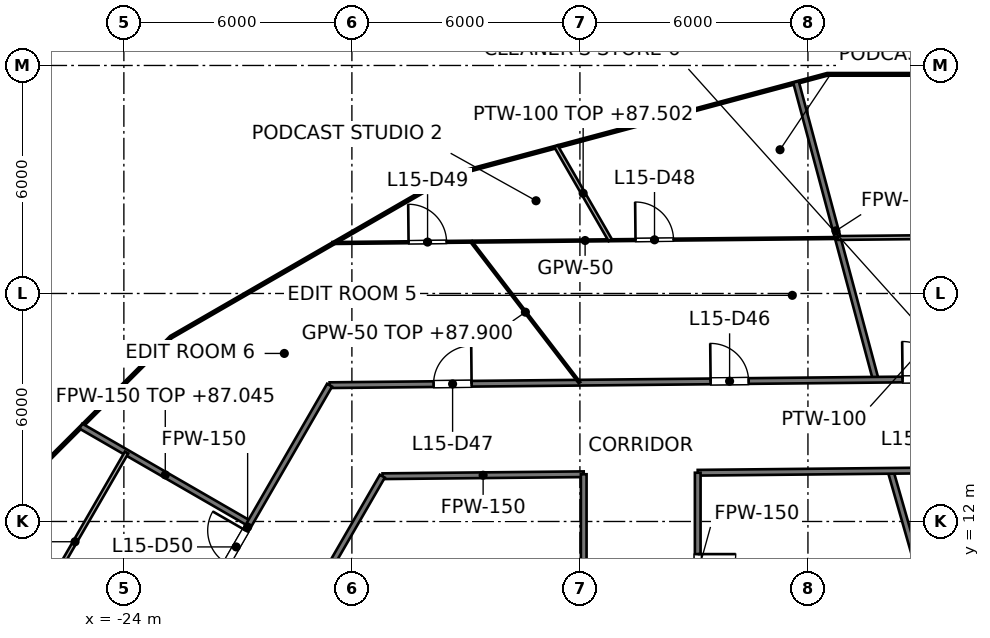
"""IFC4 building model, lengths in metres.
Left out: names, types, materials, properties, quantities, classifications, styles, units other than length and angle.
Written with IfcOpenShell. Run it as: python <this file> out.ifc"""

import sys

from ifc_helpers import new_model, si_unit, direction, frame, frame_2d, origin, place, context, subcontext, project, spatial, rectangle, extrude, element, fill, save


model = new_model("IFC4")
c1 = context("Model", 3, precision=1e-05, world=origin(), true_north=direction((0.0, 1.0)))
c2 = subcontext(c1, "Body", "Model", "MODEL_VIEW")
j1 = project(units=[si_unit("LENGTHUNIT", "METRE"), si_unit("PLANEANGLEUNIT", "RADIAN")], contexts=[c1])
p1 = place(None, origin())
s1 = spatial("IfcSite", under=j1, at=p1, CompositionType="ELEMENT")
p2 = place(p1, origin())
s2 = spatial("IfcBuilding", under=s1, at=p2, CompositionType="ELEMENT")
p3 = place(p2, frame((0.0, 0.0, 84.0)))
s3 = spatial("IfcBuildingStorey", under=s2, at=p3, CompositionType="ELEMENT", Elevation=84.0)
p4 = place(p3, frame((-6.315, 23.566, 0.0), z_axis=(0.0, 0.0, 1.0), x_axis=(0.258844392232, -0.96591903419, 0.0)))
e1 = element("IfcWall", 1, at=p4, inside=s3, PredefinedType="PARTITIONING", context=c2, shape_type="SweptSolid", body=[
    extrude(rectangle(XDim=8.112, YDim=0.15, at=frame_2d((4.056, 0.0))), origin(), (0.0, 0.0, 1.0), 3.502),
])
p5 = place(p3, frame((-3.827, 13.333, 0.0), z_axis=(0.0, 0.0, 1.0), x_axis=(0.275935525478, -0.961176147113, 0.0)))
e2 = element("IfcWall", 2, at=p5, inside=s3, PredefinedType="PARTITIONING", context=c2, shape_type="SweptSolid", body=[
    extrude(rectangle(XDim=5.548, YDim=0.15, at=frame_2d((2.774, 0.0))), origin(), (0.0, 0.0, 1.0), 3.9),
])
p6 = place(p3, frame((-25.131, 14.509, 0.0), z_axis=(0.0, 0.0, 1.0), x_axis=(0.866037334331, -0.499979335118, 0.0)))
e3 = element("IfcWall", 3, at=p6, inside=s3, PredefinedType="PARTITIONING", context=c2, shape_type="SweptSolid", body=[
    extrude(rectangle(XDim=5.128, YDim=0.15, at=frame_2d((2.564, 0.0))), origin(), (0.0, 0.0, 1.0), 3.045),
])
p7 = place(p3, frame((-17.194, 13.191, 0.0), z_axis=(0.0, 0.0, 1.0), x_axis=(0.999950853109, 0.009914200296, 0.0)))
e4 = element("IfcWall", 4, at=p7, inside=s3, PredefinedType="PARTITIONING", context=c2, shape_type="SweptSolid", body=[
    extrude(rectangle(XDim=5.294, YDim=0.15, at=frame_2d((2.647, 0.0))), origin(), (0.0, 0.0, 1.0), 2.968),
])
p8 = place(p3, frame((-8.9, 13.282, 0.0), z_axis=(0.0, 0.0, 1.0), x_axis=(0.999950834077, 0.009916119672, 0.0)))
e5 = element("IfcWall", 5, at=p8, inside=s3, PredefinedType="PARTITIONING", context=c2, shape_type="SweptSolid", body=[
    extrude(rectangle(XDim=17.801, YDim=0.15, at=frame_2d((8.9, 0.0))), origin(), (0.0, 0.0, 1.0), 2.968),
])
p9 = place(p8, frame((8.412, 0.0, 0.0)))
e6 = element("IfcOpeningElement", 6, at=p9, cuts=e5, PredefinedType="OPENING", context=c2, shape_type="SweptSolid", body=[
    extrude(rectangle(XDim=1.0, YDim=2.1, at=frame_2d((0.5, 1.05))), frame((0.0, 0.075, 0.0), z_axis=(0.0, -1.0, 0.0), x_axis=(1.0, 0.0, 0.0)), (0.0, 0.0, 1.0), 0.15),
])
p10 = place(p3, frame((-18.587, 15.587, 0.0), z_axis=(0.0, 0.0, 1.0), x_axis=(0.99995087003, 0.009912493396, 0.0)))
e7 = element("IfcWall", 7, at=p10, inside=s3, PredefinedType="PARTITIONING", context=c2, shape_type="SweptSolid", body=[
    extrude(rectangle(XDim=33.669, YDim=0.15, at=frame_2d((16.834, 0.0))), origin(), (0.0, 0.0, 1.0), 2.968),
])
p11 = place(p10, frame((21.034, 0.0, 0.0)))
e8 = element("IfcOpeningElement", 8, at=p11, cuts=e7, PredefinedType="OPENING", context=c2, shape_type="SweptSolid", body=[
    extrude(rectangle(XDim=1.0, YDim=2.1, at=frame_2d((0.5, 1.05))), frame((0.0, 0.075, 0.0), z_axis=(0.0, -1.0, 0.0), x_axis=(1.0, 0.0, 0.0)), (0.0, 0.0, 1.0), 0.15),
])
p12 = place(p10, frame((17.73, 0.0, 0.0)))
e9 = element("IfcOpeningElement", 9, at=p12, cuts=e7, PredefinedType="OPENING", context=c2, shape_type="SweptSolid", body=[
    extrude(rectangle(XDim=1.0, YDim=2.1, at=frame_2d((0.5, 1.05))), frame((0.0, 0.075, 0.0), z_axis=(0.0, -1.0, 0.0), x_axis=(1.0, 0.0, 0.0)), (0.0, 0.0, 1.0), 0.15),
])
p13 = place(p10, frame((15.077, 0.0, 0.0)))
e10 = element("IfcOpeningElement", 10, at=p13, cuts=e7, PredefinedType="OPENING", context=c2, shape_type="SweptSolid", body=[
    extrude(rectangle(XDim=1.0, YDim=2.1, at=frame_2d((0.5, 1.05))), frame((0.0, 0.075, 0.0), z_axis=(0.0, -1.0, 0.0), x_axis=(1.0, 0.0, 0.0)), (0.0, 0.0, 1.0), 0.15),
])
p14 = place(p10, frame((10.026, 0.0, 0.0)))
e11 = element("IfcOpeningElement", 11, at=p14, cuts=e7, PredefinedType="OPENING", context=c2, shape_type="SweptSolid", body=[
    extrude(rectangle(XDim=1.0, YDim=2.1, at=frame_2d((0.5, 1.05))), frame((0.0, 0.075, 0.0), z_axis=(0.0, -1.0, 0.0), x_axis=(1.0, 0.0, 0.0)), (0.0, 0.0, 1.0), 0.15),
])
p15 = place(p10, frame((2.737, 0.0, 0.0)))
e12 = element("IfcOpeningElement", 12, at=p15, cuts=e7, PredefinedType="OPENING", context=c2, shape_type="SweptSolid", body=[
    extrude(rectangle(XDim=1.0, YDim=2.1, at=frame_2d((0.5, 1.05))), frame((0.0, 0.075, 0.0), z_axis=(0.0, -1.0, 0.0), x_axis=(1.0, 0.0, 0.0)), (0.0, 0.0, 1.0), 0.15),
])
p16 = place(p3, frame((-20.5, 7.474, 0.0), z_axis=(0.0, 0.0, 1.0), x_axis=(0.500012665616, 0.866018091164, 0.0)))
e13 = element("IfcWall", 13, at=p16, inside=s3, PredefinedType="PARTITIONING", context=c2, shape_type="SweptSolid", body=[
    extrude(rectangle(XDim=6.602, YDim=0.15, at=frame_2d((3.301, 0.0))), origin(), (0.0, 0.0, 1.0), 2.968),
])
p17 = place(p16, frame((2.803, 0.0, 0.0)))
e14 = element("IfcOpeningElement", 14, at=p17, cuts=e13, PredefinedType="OPENING", context=c2, shape_type="SweptSolid", body=[
    extrude(rectangle(XDim=1.0, YDim=2.1, at=frame_2d((0.5, 1.05))), frame((0.0, 0.075, 0.0), z_axis=(0.0, -1.0, 0.0), x_axis=(1.0, 0.0, 0.0)), (0.0, 0.0, 1.0), 0.15),
])
p18 = place(p3, frame((-22.9, 8.117, 0.0), z_axis=(0.0, 0.0, 1.0), x_axis=(0.5000050195, 0.866022505755, 0.0)))
e15 = element("IfcWall", 15, at=p18, inside=s3, PredefinedType="PARTITIONING", context=c2, shape_type="SweptSolid", body=[
    extrude(rectangle(XDim=8.626, YDim=0.15, at=frame_2d((4.313, 0.0))), origin(), (0.0, 0.0, 1.0), 2.968),
])
p19 = place(p18, frame((3.211, 0.0, 0.0)))
e16 = element("IfcOpeningElement", 16, at=p19, cuts=e15, PredefinedType="OPENING", context=c2, shape_type="SweptSolid", body=[
    extrude(rectangle(XDim=1.0, YDim=2.1, at=frame_2d((0.5, 1.05))), frame((0.0, 0.075, 0.0), z_axis=(0.0, -1.0, 0.0), x_axis=(1.0, 0.0, 0.0)), (0.0, 0.0, 1.0), 0.15),
])
p20 = place(p3, frame((-8.9, 8.0, 0.0), z_axis=(0.0, 0.0, 1.0), x_axis=(0.0, 1.0, 0.0)))
e17 = element("IfcWall", 17, at=p20, inside=s3, PredefinedType="PARTITIONING", context=c2, shape_type="SweptSolid", body=[
    extrude(rectangle(XDim=5.283, YDim=0.15, at=frame_2d((2.642, 0.0))), origin(), (0.0, 0.0, 1.0), 2.968),
])
p21 = place(p20, frame((2.142, 0.0, 0.0)))
e18 = element("IfcOpeningElement", 18, at=p21, cuts=e17, PredefinedType="OPENING", context=c2, shape_type="SweptSolid", body=[
    extrude(rectangle(XDim=1.0, YDim=2.1, at=frame_2d((0.5, 1.05))), frame((0.0, 0.075, 0.0), z_axis=(0.0, -1.0, 0.0), x_axis=(1.0, 0.0, 0.0)), (0.0, 0.0, 1.0), 0.15),
])
p22 = place(p3, frame((-11.9, 8.0, 0.0), z_axis=(0.0, 0.0, 1.0), x_axis=(0.0, 1.0, 0.0)))
e19 = element("IfcWall", 19, at=p22, inside=s3, PredefinedType="PARTITIONING", context=c2, shape_type="SweptSolid", body=[
    extrude(rectangle(XDim=5.243, YDim=0.15, at=frame_2d((2.622, 0.0))), origin(), (0.0, 0.0, 1.0), 2.968),
])
p23 = place(p3, frame((-14.859, 19.364, 0.0), z_axis=(0.0, 0.0, 1.0), x_axis=(0.608714147517, -0.793389618418, 0.0)))
e20 = element("IfcWall", 20, at=p23, inside=s3, PredefinedType="PARTITIONING", context=c2, shape_type="SweptSolid", body=[
    extrude(rectangle(XDim=4.678, YDim=0.05, at=frame_2d((2.339, 0.0))), origin(), (0.0, 0.0, 1.0), 3.9),
])
p24 = place(p3, frame((-18.512, 19.328, 0.0), z_axis=(0.0, 0.0, 1.0), x_axis=(0.999950851933, 0.009914318817, 0.0)))
e21 = element("IfcWall", 21, at=p24, inside=s3, PredefinedType="PARTITIONING", context=c2, shape_type="SweptSolid", body=[
    extrude(rectangle(XDim=13.298, YDim=0.05, at=frame_2d((6.649, 0.0))), origin(), (0.0, 0.0, 1.0), 2.968),
])
p25 = place(p24, frame((7.975, 0.0, 0.0)))
e22 = element("IfcOpeningElement", 22, at=p25, cuts=e21, PredefinedType="OPENING", context=c2, shape_type="SweptSolid", body=[
    extrude(rectangle(XDim=1.0, YDim=2.1, at=frame_2d((0.5, 1.05))), frame((0.0, 0.025, 0.0), z_axis=(0.0, -1.0, 0.0), x_axis=(1.0, 0.0, 0.0)), (0.0, 0.0, 1.0), 0.05),
])
p26 = place(p24, frame((2.003, 0.0, 0.0)))
e23 = element("IfcOpeningElement", 23, at=p26, cuts=e21, PredefinedType="OPENING", context=c2, shape_type="SweptSolid", body=[
    extrude(rectangle(XDim=1.0, YDim=2.1, at=frame_2d((0.5, 1.05))), frame((0.0, 0.025, 0.0), z_axis=(0.0, -1.0, 0.0), x_axis=(1.0, 0.0, 0.0)), (0.0, 0.0, 1.0), 0.05),
])
p27 = place(p3, frame((-12.629, 21.874, 0.0), z_axis=(0.0, 0.0, 1.0), x_axis=(0.500028324968, -0.866009049739, 0.0)))
e24 = element("IfcWall", 24, at=p27, inside=s3, PredefinedType="PARTITIONING", context=c2, shape_type="SweptSolid", body=[
    extrude(rectangle(XDim=2.856, YDim=0.1, at=frame_2d((1.428, 0.0))), origin(), (0.0, 0.0, 1.0), 3.502),
])
p28 = place(p3, frame((-5.215, 19.46, 0.0), z_axis=(0.0, 0.0, 1.0), x_axis=(0.999950988801, 0.00990050484, 0.0)))
e25 = element("IfcWall", 25, at=p28, inside=s3, PredefinedType="PARTITIONING", context=c2, shape_type="SweptSolid", body=[
    extrude(rectangle(XDim=21.281, YDim=0.1, at=frame_2d((10.641, 0.0))), origin(), (0.0, 0.0, 1.0), 2.968),
])
p29 = place(p28, frame((13.255, 0.0, 0.0)))
e26 = element("IfcOpeningElement", 26, at=p29, cuts=e25, PredefinedType="OPENING", context=c2, shape_type="SweptSolid", body=[
    extrude(rectangle(XDim=0.9, YDim=2.1, at=frame_2d((0.45, 1.05))), frame((0.0, 0.05, 0.0), z_axis=(0.0, -1.0, 0.0), x_axis=(1.0, 0.0, 0.0)), (0.0, 0.0, 1.0), 0.1),
])
p30 = place(p3, frame((-26.64, 9.119, 0.0), z_axis=(0.0, 0.0, 1.0), x_axis=(0.499955005135, 0.866051380023, 0.0)))
e27 = element("IfcWall", 27, at=p30, inside=s3, PredefinedType="PARTITIONING", context=c2, shape_type="SweptSolid", body=[
    extrude(rectangle(XDim=5.422, YDim=0.1, at=frame_2d((2.711, 0.0))), origin(), (0.0, 0.0, 1.0), 2.977),
])
p31 = place(p21, origin())
e28 = element("IfcDoor", 28, at=p31, inside=s3, OperationType="SINGLE_SWING_RIGHT", PredefinedType="DOOR", context=c2, shape_type="SweptSolid", body=[
    extrude(rectangle(XDim=1.0, YDim=2.1, at=frame_2d((0.5, 1.05))), frame((0.0, 0.025, 0.0), z_axis=(0.0, -1.0, 0.0), x_axis=(1.0, 0.0, 0.0)), (0.0, 0.0, 1.0), 0.05),
])
fill(e18, e28)
p32 = place(p13, origin())
e29 = element("IfcDoor", 29, at=p32, inside=s3, OperationType="SINGLE_SWING_LEFT", PredefinedType="DOOR", context=c2, shape_type="SweptSolid", body=[
    extrude(rectangle(XDim=1.0, YDim=2.1, at=frame_2d((0.5, 1.05))), frame((0.0, 0.025, 0.0), z_axis=(0.0, -1.0, 0.0), x_axis=(1.0, 0.0, 0.0)), (0.0, 0.0, 1.0), 0.05),
])
fill(e10, e29)
p33 = place(p14, origin())
e30 = element("IfcDoor", 30, at=p33, inside=s3, OperationType="SINGLE_SWING_LEFT", PredefinedType="DOOR", context=c2, shape_type="SweptSolid", body=[
    extrude(rectangle(XDim=1.0, YDim=2.1, at=frame_2d((0.5, 1.05))), frame((0.0, 0.025, 0.0), z_axis=(0.0, -1.0, 0.0), x_axis=(1.0, 0.0, 0.0)), (0.0, 0.0, 1.0), 0.05),
])
fill(e11, e30)
p34 = place(p15, origin())
e31 = element("IfcDoor", 31, at=p34, inside=s3, OperationType="SINGLE_SWING_RIGHT", PredefinedType="DOOR", context=c2, shape_type="SweptSolid", body=[
    extrude(rectangle(XDim=1.0, YDim=2.1, at=frame_2d((0.5, 1.05))), frame((0.0, 0.025, 0.0), z_axis=(0.0, -1.0, 0.0), x_axis=(1.0, 0.0, 0.0)), (0.0, 0.0, 1.0), 0.05),
])
fill(e12, e31)
p35 = place(p25, origin())
e32 = element("IfcDoor", 32, at=p35, inside=s3, OperationType="SINGLE_SWING_LEFT", PredefinedType="DOOR", context=c2, shape_type="SweptSolid", body=[
    extrude(rectangle(XDim=1.0, YDim=2.1, at=frame_2d((0.5, 1.05))), frame((0.0, 0.025, 0.0), z_axis=(0.0, -1.0, 0.0), x_axis=(1.0, 0.0, 0.0)), (0.0, 0.0, 1.0), 0.05),
])
fill(e22, e32)
p36 = place(p26, origin())
e33 = element("IfcDoor", 33, at=p36, inside=s3, OperationType="SINGLE_SWING_LEFT", PredefinedType="DOOR", context=c2, shape_type="SweptSolid", body=[
    extrude(rectangle(XDim=1.0, YDim=2.1, at=frame_2d((0.5, 1.05))), frame((0.0, 0.025, 0.0), z_axis=(0.0, -1.0, 0.0), x_axis=(1.0, 0.0, 0.0)), (0.0, 0.0, 1.0), 0.05),
])
fill(e23, e33)
p37 = place(p19, origin())
e34 = element("IfcDoor", 34, at=p37, inside=s3, OperationType="SINGLE_SWING_RIGHT", PredefinedType="DOOR", context=c2, shape_type="SweptSolid", body=[
    extrude(rectangle(XDim=1.0, YDim=2.1, at=frame_2d((0.5, 1.05))), frame((0.0, 0.025, 0.0), z_axis=(0.0, -1.0, 0.0), x_axis=(1.0, 0.0, 0.0)), (0.0, 0.0, 1.0), 0.05),
])
fill(e16, e34)
save(model, sys.argv[1])
